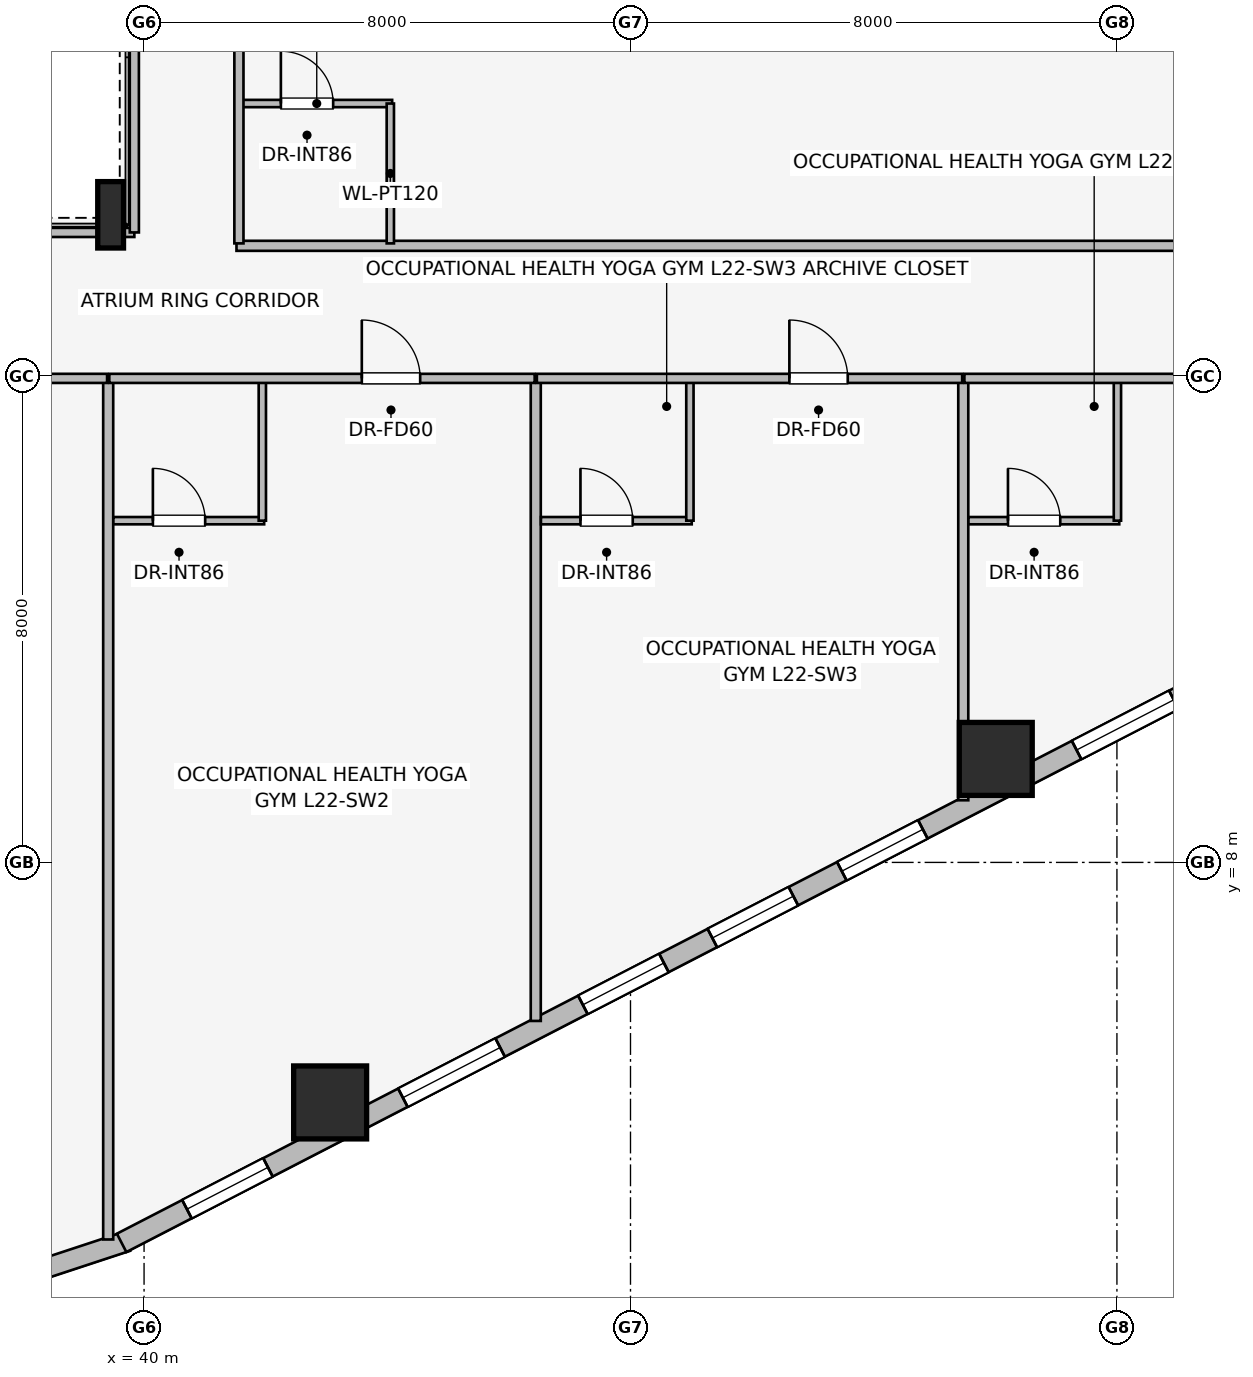
"""IFC4 building model, lengths in metres.
Left out: names, types, materials, properties, quantities, classifications, styles, units other than length and angle.
Written with IfcOpenShell. Run it as: python <this file> out.ifc"""

import sys

from ifc_helpers import new_model, si_unit, direction, frame, frame_2d, origin, origin_2d, place, context, subcontext, project, spatial, rectangle, i_section, extrude, element, fill, save


model = new_model("IFC4")
c1 = context("Model", 3, precision=1e-05, world=origin(), true_north=direction((0.0, 1.0)))
c2 = subcontext(c1, "Body", "Model", "MODEL_VIEW")
j1 = project(units=[si_unit("LENGTHUNIT", "METRE"), si_unit("PLANEANGLEUNIT", "RADIAN")], contexts=[c1])
p1 = place(None, origin())
s1 = spatial("IfcSite", under=j1, at=p1, CompositionType="ELEMENT")
p2 = place(p1, origin())
s2 = spatial("IfcBuilding", under=s1, at=p2, CompositionType="ELEMENT")
p3 = place(p2, frame((0.0, 0.0, 85.4)))
s3 = spatial("IfcBuildingStorey", under=s2, at=p3, CompositionType="ELEMENT", Elevation=85.4)
for number, where, z_axis, x_axis in (
    (1, (43.06, 4.053, 0.0), (0.0, 0.0, 1.0), (1.0, 0.0, 0.0)),
    (2, (54.007, 9.702, 0.0), (0.0, 0.0, 1.0), (1.0, 0.0, 0.0)),
):
    element("IfcColumn", number, at=place(p3, frame(where, z_axis=z_axis, x_axis=x_axis)), inside=s3, PredefinedType="COLUMN", context=c2, shape_type="SweptSolid", body=[
        extrude(rectangle(XDim=1.2, YDim=1.2, at=origin_2d()), origin(), (0.0, 0.0, 1.0), 3.65),
    ])
p4 = place(p3, frame((39.45, 18.65, 0.0), z_axis=(0.0, 0.0, 1.0), x_axis=(1.0, 0.0, 0.0)))
e3 = element("IfcColumn", 3, at=p4, inside=s3, PredefinedType="COLUMN", context=c2, shape_type="SweptSolid", body=[
    extrude(i_section(OverallWidth=0.424, OverallDepth=1.092, WebThickness=0.045, FlangeThickness=0.082, at=origin_2d()), origin(), (0.0, 0.0, 1.0), 3.65),
])
p5 = place(p3, frame((39.719, 1.769, 0.0), z_axis=(0.0, 0.0, 1.0), x_axis=(-0.94976901097, -0.312951794691, 0.0)))
e4 = element("IfcWall", 4, at=p5, inside=s3, PredefinedType="STANDARD", context=c2, shape_type="SweptSolid", body=[
    extrude(rectangle(XDim=1.722, YDim=0.33, at=frame_2d((0.861, 0.0))), origin(), (0.0, 0.0, 1.0), 3.39),
])
p6 = place(p3, frame((57.876, 11.159, 0.0), z_axis=(0.0, 0.0, 1.0), x_axis=(-0.888634413993, -0.458616264721, 0.0)))
e5 = element("IfcWall", 5, at=p6, inside=s3, PredefinedType="STANDARD", context=c2, shape_type="SweptSolid", body=[
    extrude(rectangle(XDim=20.531, YDim=0.34, at=frame_2d((10.266, 0.0))), origin(), (0.0, 0.0, 1.0), 2.684),
])
p7 = place(p6, frame((1.058, 0.0, 0.75)))
e6 = element("IfcOpeningElement", 6, at=p7, cuts=e5, PredefinedType="OPENING", context=c2, shape_type="SweptSolid", body=[
    extrude(rectangle(XDim=1.8, YDim=1.5, at=frame_2d((0.9, 0.75))), frame((0.0, 0.18, 0.0), z_axis=(0.0, -1.0, 0.0), x_axis=(1.0, 0.0, 0.0)), (0.0, 0.0, 1.0), 0.36),
])
p8 = place(p6, frame((5.703, 0.0, 0.75)))
e7 = element("IfcOpeningElement", 7, at=p8, cuts=e5, PredefinedType="OPENING", context=c2, shape_type="SweptSolid", body=[
    extrude(rectangle(XDim=1.5, YDim=1.5, at=frame_2d((0.75, 0.75))), frame((0.0, 0.18, 0.0), z_axis=(0.0, -1.0, 0.0), x_axis=(1.0, 0.0, 0.0)), (0.0, 0.0, 1.0), 0.36),
])
p9 = place(p6, frame((8.099, 0.0, 0.75)))
e8 = element("IfcOpeningElement", 8, at=p9, cuts=e5, PredefinedType="OPENING", context=c2, shape_type="SweptSolid", body=[
    extrude(rectangle(XDim=1.5, YDim=1.5, at=frame_2d((0.75, 0.75))), frame((0.0, 0.18, 0.0), z_axis=(0.0, -1.0, 0.0), x_axis=(1.0, 0.0, 0.0)), (0.0, 0.0, 1.0), 0.36),
])
p10 = place(p6, frame((10.495, 0.0, 0.75)))
e9 = element("IfcOpeningElement", 9, at=p10, cuts=e5, PredefinedType="OPENING", context=c2, shape_type="SweptSolid", body=[
    extrude(rectangle(XDim=1.5, YDim=1.5, at=frame_2d((0.75, 0.75))), frame((0.0, 0.18, 0.0), z_axis=(0.0, -1.0, 0.0), x_axis=(1.0, 0.0, 0.0)), (0.0, 0.0, 1.0), 0.36),
])
p11 = place(p6, frame((13.526, 0.0, 0.75)))
e10 = element("IfcOpeningElement", 10, at=p11, cuts=e5, PredefinedType="OPENING", context=c2, shape_type="SweptSolid", body=[
    extrude(rectangle(XDim=1.8, YDim=1.5, at=frame_2d((0.9, 0.75))), frame((0.0, 0.18, 0.0), z_axis=(0.0, -1.0, 0.0), x_axis=(1.0, 0.0, 0.0)), (0.0, 0.0, 1.0), 0.36),
])
p12 = place(p6, frame((17.823, 0.0, 0.75)))
e11 = element("IfcOpeningElement", 11, at=p12, cuts=e5, PredefinedType="OPENING", context=c2, shape_type="SweptSolid", body=[
    extrude(rectangle(XDim=1.5, YDim=1.5, at=frame_2d((0.75, 0.75))), frame((0.0, 0.18, 0.0), z_axis=(0.0, -1.0, 0.0), x_axis=(1.0, 0.0, 0.0)), (0.0, 0.0, 1.0), 0.36),
])
p13 = place(p3, frame((27.7, 18.36, 0.0), z_axis=(0.0, 0.0, 1.0), x_axis=(1.0, 0.0, 0.0)))
e12 = element("IfcWall", 12, at=p13, inside=s3, PredefinedType="PARTITIONING", context=c2, shape_type="SweptSolid", body=[
    extrude(rectangle(XDim=12.14, YDim=0.15, at=frame_2d((6.07, 0.0))), origin(), (0.0, 0.0, 1.0), 2.531),
])
p14 = place(p3, frame((39.84, 18.36, 0.0), z_axis=(0.0, 0.0, 1.0), x_axis=(0.0, 1.0, 0.0)))
e13 = element("IfcWall", 13, at=p14, inside=s3, PredefinedType="PARTITIONING", context=c2, shape_type="SweptSolid", body=[
    extrude(rectangle(XDim=11.28, YDim=0.15, at=frame_2d((5.64, 0.0))), origin(), (0.0, 0.0, 1.0), 2.513),
])
p15 = place(p3, frame((41.52, 18.14, 0.0), z_axis=(0.0, 0.0, 1.0), x_axis=(1.0, 0.0, 0.0)))
e14 = element("IfcWall", 14, at=p15, inside=s3, PredefinedType="PARTITIONING", context=c2, shape_type="SweptSolid", body=[
    extrude(rectangle(XDim=18.453, YDim=0.165, at=frame_2d((9.227, 0.0))), origin(), (0.0, 0.0, 1.0), 3.39),
])
p16 = place(p3, frame((41.6, 20.48, 0.0), z_axis=(0.0, 0.0, 1.0), x_axis=(1.0, 0.0, 0.0)))
e15 = element("IfcWall", 15, at=p16, inside=s3, PredefinedType="PARTITIONING", context=c2, shape_type="SweptSolid", body=[
    extrude(rectangle(XDim=2.48, YDim=0.12, at=frame_2d((1.24, 0.0))), origin(), (0.0, 0.0, 1.0), 3.39),
])
p17 = place(p16, frame((0.65, 0.0, 0.0)))
e16 = element("IfcOpeningElement", 16, at=p17, cuts=e15, PredefinedType="OPENING", context=c2, shape_type="SweptSolid", body=[
    extrude(rectangle(XDim=0.86, YDim=2.0, at=frame_2d((0.43, 1.0))), frame((0.0, 0.07, 0.0), z_axis=(0.0, -1.0, 0.0), x_axis=(1.0, 0.0, 0.0)), (0.0, 0.0, 1.0), 0.14),
])
p18 = place(p3, frame((44.05, 18.18, 0.0), z_axis=(0.0, 0.0, 1.0), x_axis=(0.0, 1.0, 0.0)))
e17 = element("IfcWall", 17, at=p18, inside=s3, PredefinedType="PARTITIONING", context=c2, shape_type="SweptSolid", body=[
    extrude(rectangle(XDim=2.3, YDim=0.12, at=frame_2d((1.15, 0.0))), origin(), (0.0, 0.0, 1.0), 3.39),
])
p19 = place(p3, frame((41.56, 18.18, 0.0), z_axis=(0.0, 0.0, 1.0), x_axis=(0.0, 1.0, 0.0)))
e18 = element("IfcWall", 18, at=p19, inside=s3, PredefinedType="PARTITIONING", context=c2, shape_type="SweptSolid", body=[
    extrude(rectangle(XDim=11.64, YDim=0.15, at=frame_2d((5.82, 0.0))), origin(), (0.0, 0.0, 1.0), 3.39),
])
p20 = place(p19, frame((6.615, 0.0, 0.0)))
e19 = element("IfcOpeningElement", 19, at=p20, cuts=e18, PredefinedType="OPENING", context=c2, shape_type="SweptSolid", body=[
    extrude(rectangle(XDim=0.96, YDim=2.0, at=frame_2d((0.48, 1.0))), frame((0.0, 0.085, 0.0), z_axis=(0.0, -1.0, 0.0), x_axis=(1.0, 0.0, 0.0)), (0.0, 0.0, 1.0), 0.17),
])
p21 = place(p3, frame((39.41, 1.799, 0.0), z_axis=(0.0, 0.0, 1.0), x_axis=(0.0, 1.0, 0.0)))
e20 = element("IfcWall", 20, at=p21, inside=s3, PredefinedType="PARTITIONING", context=c2, shape_type="SweptSolid", body=[
    extrude(rectangle(XDim=14.131, YDim=0.165, at=frame_2d((7.065, 0.0))), origin(), (0.0, 0.0, 1.0), 3.39),
])
p22 = place(p3, frame((46.442, 5.393, 0.0), z_axis=(0.0, 0.0, 1.0), x_axis=(0.0, 1.0, 0.0)))
e21 = element("IfcWall", 21, at=p22, inside=s3, PredefinedType="PARTITIONING", context=c2, shape_type="SweptSolid", body=[
    extrude(rectangle(XDim=10.537, YDim=0.165, at=frame_2d((5.269, 0.0))), origin(), (0.0, 0.0, 1.0), 3.39),
])
p23 = place(p3, frame((53.473, 9.022, 0.0), z_axis=(0.0, 0.0, 1.0), x_axis=(0.0, 1.0, 0.0)))
e22 = element("IfcWall", 22, at=p23, inside=s3, PredefinedType="PARTITIONING", context=c2, shape_type="SweptSolid", body=[
    extrude(rectangle(XDim=6.908, YDim=0.165, at=frame_2d((3.454, 0.0))), origin(), (0.0, 0.0, 1.0), 3.39),
])
p24 = place(p3, frame((32.85, 15.96, 0.0), z_axis=(0.0, 0.0, 1.0), x_axis=(1.0, 0.0, 0.0)))
e23 = element("IfcWall", 23, at=p24, inside=s3, PredefinedType="PARTITIONING", context=c2, shape_type="SweptSolid", body=[
    extrude(rectangle(XDim=6.542, YDim=0.15, at=frame_2d((3.271, 0.0))), origin(), (0.0, 0.0, 1.0), 3.39),
])
p25 = place(p24, frame((2.791, 0.0, 0.0)))
e24 = element("IfcOpeningElement", 24, at=p25, cuts=e23, PredefinedType="OPENING", context=c2, shape_type="SweptSolid", body=[
    extrude(rectangle(XDim=0.96, YDim=2.0, at=frame_2d((0.48, 1.0))), frame((0.0, 0.085, 0.0), z_axis=(0.0, -1.0, 0.0), x_axis=(1.0, 0.0, 0.0)), (0.0, 0.0, 1.0), 0.17),
])
p26 = place(p3, frame((39.495, 13.62, 0.0), z_axis=(0.0, 0.0, 1.0), x_axis=(1.0, 0.0, 0.0)))
e25 = element("IfcWall", 25, at=p26, inside=s3, PredefinedType="PARTITIONING", context=c2, shape_type="SweptSolid", body=[
    extrude(rectangle(XDim=2.48, YDim=0.12, at=frame_2d((1.24, 0.0))), origin(), (0.0, 0.0, 1.0), 3.39),
])
p27 = place(p26, frame((0.65, 0.0, 0.0)))
e26 = element("IfcOpeningElement", 26, at=p27, cuts=e25, PredefinedType="OPENING", context=c2, shape_type="SweptSolid", body=[
    extrude(rectangle(XDim=0.86, YDim=2.0, at=frame_2d((0.43, 1.0))), frame((0.0, 0.07, 0.0), z_axis=(0.0, -1.0, 0.0), x_axis=(1.0, 0.0, 0.0)), (0.0, 0.0, 1.0), 0.14),
])
p28 = place(p3, frame((41.945, 13.62, 0.0), z_axis=(0.0, 0.0, 1.0), x_axis=(0.0, 1.0, 0.0)))
e27 = element("IfcWall", 27, at=p28, inside=s3, PredefinedType="PARTITIONING", context=c2, shape_type="SweptSolid", body=[
    extrude(rectangle(XDim=2.3, YDim=0.12, at=frame_2d((1.15, 0.0))), origin(), (0.0, 0.0, 1.0), 3.39),
])
p29 = place(p3, frame((39.428, 15.96, 0.0), z_axis=(0.0, 0.0, 1.0), x_axis=(1.0, 0.0, 0.0)))
e28 = element("IfcWall", 28, at=p29, inside=s3, PredefinedType="PARTITIONING", context=c2, shape_type="SweptSolid", body=[
    extrude(rectangle(XDim=6.996, YDim=0.15, at=frame_2d((3.498, 0.0))), origin(), (0.0, 0.0, 1.0), 3.39),
])
p30 = place(p29, frame((4.153, 0.0, 0.0)))
e29 = element("IfcOpeningElement", 29, at=p30, cuts=e28, PredefinedType="OPENING", context=c2, shape_type="SweptSolid", body=[
    extrude(rectangle(XDim=0.96, YDim=2.0, at=frame_2d((0.48, 1.0))), frame((0.0, 0.085, 0.0), z_axis=(0.0, -1.0, 0.0), x_axis=(1.0, 0.0, 0.0)), (0.0, 0.0, 1.0), 0.17),
])
p31 = place(p3, frame((46.527, 13.62, 0.0), z_axis=(0.0, 0.0, 1.0), x_axis=(1.0, 0.0, 0.0)))
e30 = element("IfcWall", 30, at=p31, inside=s3, PredefinedType="PARTITIONING", context=c2, shape_type="SweptSolid", body=[
    extrude(rectangle(XDim=2.48, YDim=0.12, at=frame_2d((1.24, 0.0))), origin(), (0.0, 0.0, 1.0), 3.39),
])
p32 = place(p31, frame((0.65, 0.0, 0.0)))
e31 = element("IfcOpeningElement", 31, at=p32, cuts=e30, PredefinedType="OPENING", context=c2, shape_type="SweptSolid", body=[
    extrude(rectangle(XDim=0.86, YDim=2.0, at=frame_2d((0.43, 1.0))), frame((0.0, 0.07, 0.0), z_axis=(0.0, -1.0, 0.0), x_axis=(1.0, 0.0, 0.0)), (0.0, 0.0, 1.0), 0.14),
])
p33 = place(p3, frame((48.977, 13.62, 0.0), z_axis=(0.0, 0.0, 1.0), x_axis=(0.0, 1.0, 0.0)))
e32 = element("IfcWall", 32, at=p33, inside=s3, PredefinedType="PARTITIONING", context=c2, shape_type="SweptSolid", body=[
    extrude(rectangle(XDim=2.3, YDim=0.12, at=frame_2d((1.15, 0.0))), origin(), (0.0, 0.0, 1.0), 3.39),
])
p34 = place(p3, frame((46.46, 15.96, 0.0), z_axis=(0.0, 0.0, 1.0), x_axis=(1.0, 0.0, 0.0)))
e33 = element("IfcWall", 33, at=p34, inside=s3, PredefinedType="PARTITIONING", context=c2, shape_type="SweptSolid", body=[
    extrude(rectangle(XDim=6.995, YDim=0.15, at=frame_2d((3.498, 0.0))), origin(), (0.0, 0.0, 1.0), 3.39),
])
p35 = place(p34, frame((4.153, 0.0, 0.0)))
e34 = element("IfcOpeningElement", 34, at=p35, cuts=e33, PredefinedType="OPENING", context=c2, shape_type="SweptSolid", body=[
    extrude(rectangle(XDim=0.96, YDim=2.0, at=frame_2d((0.48, 1.0))), frame((0.0, 0.085, 0.0), z_axis=(0.0, -1.0, 0.0), x_axis=(1.0, 0.0, 0.0)), (0.0, 0.0, 1.0), 0.17),
])
p36 = place(p3, frame((53.558, 13.62, 0.0), z_axis=(0.0, 0.0, 1.0), x_axis=(1.0, 0.0, 0.0)))
e35 = element("IfcWall", 35, at=p36, inside=s3, PredefinedType="PARTITIONING", context=c2, shape_type="SweptSolid", body=[
    extrude(rectangle(XDim=2.48, YDim=0.12, at=frame_2d((1.24, 0.0))), origin(), (0.0, 0.0, 1.0), 3.39),
])
p37 = place(p36, frame((0.65, 0.0, 0.0)))
e36 = element("IfcOpeningElement", 36, at=p37, cuts=e35, PredefinedType="OPENING", context=c2, shape_type="SweptSolid", body=[
    extrude(rectangle(XDim=0.86, YDim=2.0, at=frame_2d((0.43, 1.0))), frame((0.0, 0.07, 0.0), z_axis=(0.0, -1.0, 0.0), x_axis=(1.0, 0.0, 0.0)), (0.0, 0.0, 1.0), 0.14),
])
p38 = place(p3, frame((56.008, 13.62, 0.0), z_axis=(0.0, 0.0, 1.0), x_axis=(0.0, 1.0, 0.0)))
e37 = element("IfcWall", 37, at=p38, inside=s3, PredefinedType="PARTITIONING", context=c2, shape_type="SweptSolid", body=[
    extrude(rectangle(XDim=2.3, YDim=0.12, at=frame_2d((1.15, 0.0))), origin(), (0.0, 0.0, 1.0), 3.39),
])
p39 = place(p3, frame((53.491, 15.96, 0.0), z_axis=(0.0, 0.0, 1.0), x_axis=(1.0, 0.0, 0.0)))
e38 = element("IfcWall", 38, at=p39, inside=s3, PredefinedType="PARTITIONING", context=c2, shape_type="SweptSolid", body=[
    extrude(rectangle(XDim=6.762, YDim=0.15, at=frame_2d((3.381, 0.0))), origin(), (0.0, 0.0, 1.0), 3.39),
])
p40 = place(p39, frame((4.05, 0.0, 0.0)))
e39 = element("IfcOpeningElement", 39, at=p40, cuts=e38, PredefinedType="OPENING", context=c2, shape_type="SweptSolid", body=[
    extrude(rectangle(XDim=0.96, YDim=2.0, at=frame_2d((0.48, 1.0))), frame((0.0, 0.085, 0.0), z_axis=(0.0, -1.0, 0.0), x_axis=(1.0, 0.0, 0.0)), (0.0, 0.0, 1.0), 0.17),
])
p41 = place(p7, origin())
e40 = element("IfcWindow", 40, at=p41, inside=s3, PartitioningType="SINGLE_PANEL", PredefinedType="WINDOW", context=c2, shape_type="SweptSolid", body=[
    extrude(rectangle(XDim=1.8, YDim=1.5, at=frame_2d((0.9, 0.75))), frame((0.0, 0.03, 0.0), z_axis=(0.0, -1.0, 0.0), x_axis=(1.0, 0.0, 0.0)), (0.0, 0.0, 1.0), 0.06),
])
fill(e6, e40)
p42 = place(p8, origin())
e41 = element("IfcWindow", 41, at=p42, inside=s3, PartitioningType="SINGLE_PANEL", PredefinedType="WINDOW", context=c2, shape_type="SweptSolid", body=[
    extrude(rectangle(XDim=1.5, YDim=1.5, at=frame_2d((0.75, 0.75))), frame((0.0, 0.03, 0.0), z_axis=(0.0, -1.0, 0.0), x_axis=(1.0, 0.0, 0.0)), (0.0, 0.0, 1.0), 0.06),
])
fill(e7, e41)
p43 = place(p9, origin())
e42 = element("IfcWindow", 42, at=p43, inside=s3, PartitioningType="SINGLE_PANEL", PredefinedType="WINDOW", context=c2, shape_type="SweptSolid", body=[
    extrude(rectangle(XDim=1.5, YDim=1.5, at=frame_2d((0.75, 0.75))), frame((0.0, 0.03, 0.0), z_axis=(0.0, -1.0, 0.0), x_axis=(1.0, 0.0, 0.0)), (0.0, 0.0, 1.0), 0.06),
])
fill(e8, e42)
p44 = place(p10, origin())
e43 = element("IfcWindow", 43, at=p44, inside=s3, PartitioningType="SINGLE_PANEL", PredefinedType="WINDOW", context=c2, shape_type="SweptSolid", body=[
    extrude(rectangle(XDim=1.5, YDim=1.5, at=frame_2d((0.75, 0.75))), frame((0.0, 0.03, 0.0), z_axis=(0.0, -1.0, 0.0), x_axis=(1.0, 0.0, 0.0)), (0.0, 0.0, 1.0), 0.06),
])
fill(e9, e43)
p45 = place(p11, origin())
e44 = element("IfcWindow", 44, at=p45, inside=s3, PartitioningType="SINGLE_PANEL", PredefinedType="WINDOW", context=c2, shape_type="SweptSolid", body=[
    extrude(rectangle(XDim=1.8, YDim=1.5, at=frame_2d((0.9, 0.75))), frame((0.0, 0.03, 0.0), z_axis=(0.0, -1.0, 0.0), x_axis=(1.0, 0.0, 0.0)), (0.0, 0.0, 1.0), 0.06),
])
fill(e10, e44)
p46 = place(p12, origin())
e45 = element("IfcWindow", 45, at=p46, inside=s3, PartitioningType="SINGLE_PANEL", PredefinedType="WINDOW", context=c2, shape_type="SweptSolid", body=[
    extrude(rectangle(XDim=1.5, YDim=1.5, at=frame_2d((0.75, 0.75))), frame((0.0, 0.03, 0.0), z_axis=(0.0, -1.0, 0.0), x_axis=(1.0, 0.0, 0.0)), (0.0, 0.0, 1.0), 0.06),
])
fill(e11, e45)
p47 = place(p17, origin())
e46 = element("IfcDoor", 46, at=p47, inside=s3, OperationType="SINGLE_SWING_LEFT", PredefinedType="DOOR", context=c2, shape_type="SweptSolid", body=[
    extrude(rectangle(XDim=0.86, YDim=2.0, at=frame_2d((0.43, 1.0))), frame((0.0, 0.025, 0.0), z_axis=(0.0, -1.0, 0.0), x_axis=(1.0, 0.0, 0.0)), (0.0, 0.0, 1.0), 0.05),
])
fill(e16, e46)
p48 = place(p27, origin())
e47 = element("IfcDoor", 47, at=p48, inside=s3, OperationType="SINGLE_SWING_LEFT", PredefinedType="DOOR", context=c2, shape_type="SweptSolid", body=[
    extrude(rectangle(XDim=0.86, YDim=2.0, at=frame_2d((0.43, 1.0))), frame((0.0, 0.025, 0.0), z_axis=(0.0, -1.0, 0.0), x_axis=(1.0, 0.0, 0.0)), (0.0, 0.0, 1.0), 0.05),
])
fill(e26, e47)
p49 = place(p30, origin())
e48 = element("IfcDoor", 48, at=p49, inside=s3, OperationType="SINGLE_SWING_LEFT", PredefinedType="DOOR", context=c2, shape_type="SweptSolid", body=[
    extrude(rectangle(XDim=0.96, YDim=2.0, at=frame_2d((0.48, 1.0))), frame((0.0, 0.025, 0.0), z_axis=(0.0, -1.0, 0.0), x_axis=(1.0, 0.0, 0.0)), (0.0, 0.0, 1.0), 0.05),
])
fill(e29, e48)
p50 = place(p32, origin())
e49 = element("IfcDoor", 49, at=p50, inside=s3, OperationType="SINGLE_SWING_LEFT", PredefinedType="DOOR", context=c2, shape_type="SweptSolid", body=[
    extrude(rectangle(XDim=0.86, YDim=2.0, at=frame_2d((0.43, 1.0))), frame((0.0, 0.025, 0.0), z_axis=(0.0, -1.0, 0.0), x_axis=(1.0, 0.0, 0.0)), (0.0, 0.0, 1.0), 0.05),
])
fill(e31, e49)
p51 = place(p35, origin())
e50 = element("IfcDoor", 50, at=p51, inside=s3, OperationType="SINGLE_SWING_LEFT", PredefinedType="DOOR", context=c2, shape_type="SweptSolid", body=[
    extrude(rectangle(XDim=0.96, YDim=2.0, at=frame_2d((0.48, 1.0))), frame((0.0, 0.025, 0.0), z_axis=(0.0, -1.0, 0.0), x_axis=(1.0, 0.0, 0.0)), (0.0, 0.0, 1.0), 0.05),
])
fill(e34, e50)
p52 = place(p37, origin())
e51 = element("IfcDoor", 51, at=p52, inside=s3, OperationType="SINGLE_SWING_LEFT", PredefinedType="DOOR", context=c2, shape_type="SweptSolid", body=[
    extrude(rectangle(XDim=0.86, YDim=2.0, at=frame_2d((0.43, 1.0))), frame((0.0, 0.025, 0.0), z_axis=(0.0, -1.0, 0.0), x_axis=(1.0, 0.0, 0.0)), (0.0, 0.0, 1.0), 0.05),
])
fill(e36, e51)
save(model, sys.argv[1])
